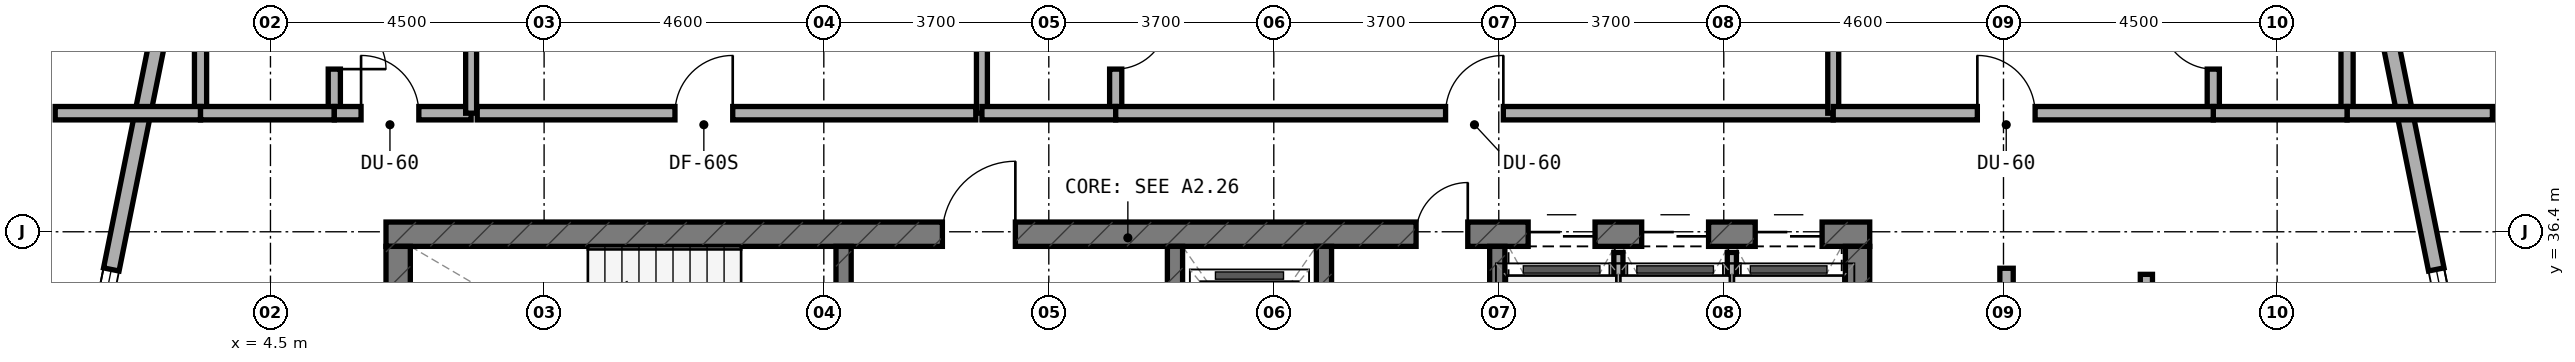
"""IFC4 building model, lengths in metres.
Left out: names, types, materials, properties, quantities, classifications, styles, units other than length and angle.
Written with IfcOpenShell. Run it as: python <this file> out.ifc"""

import sys

from ifc_helpers import new_model, si_unit, direction, frame, frame_2d, origin, place, context, subcontext, project, spatial, rectangle, extrude, element, fill, save


model = new_model("IFC4")
c1 = context("Model", 3, precision=1e-05, world=origin(), true_north=direction((0.0, 1.0)))
c2 = subcontext(c1, "Body", "Model", "MODEL_VIEW")
j1 = project(units=[si_unit("LENGTHUNIT", "METRE"), si_unit("PLANEANGLEUNIT", "RADIAN")], contexts=[c1])
p1 = place(None, origin())
s1 = spatial("IfcSite", under=j1, at=p1, CompositionType="ELEMENT")
p2 = place(p1, origin())
s2 = spatial("IfcBuilding", under=s1, at=p2, CompositionType="ELEMENT")
p3 = place(p2, frame((0.0, 0.0, 116.0)))
s3 = spatial("IfcBuildingStorey", under=s2, at=p3, CompositionType="ELEMENT", Elevation=116.0)
p4 = place(p3, frame((6.4, 36.36, 0.0), z_axis=(0.0, 0.0, 1.0), x_axis=(1.0, 0.0, 0.0)))
e1 = element("IfcWall", 1, at=p4, inside=s3, PredefinedType="SHEAR", context=c2, shape_type="SweptSolid", body=[
    extrude(rectangle(XDim=24.4, YDim=0.4, at=frame_2d((12.2, 0.0))), origin(), (0.0, 0.0, 1.0), 3.5),
])
p5 = place(p4, frame((9.15, 0.0, 0.0)))
e2 = element("IfcOpeningElement", 2, at=p5, cuts=e1, PredefinedType="OPENING", context=c2, shape_type="SweptSolid", body=[
    extrude(rectangle(XDim=1.2, YDim=2.15, at=frame_2d((0.6, 1.075))), frame((0.0, 0.21, 0.0), z_axis=(0.0, -1.0, 0.0), x_axis=(1.0, 0.0, 0.0)), (0.0, 0.0, 1.0), 0.42),
])
p6 = place(p4, frame((16.94, 0.0, 0.0)))
e3 = element("IfcOpeningElement", 3, at=p6, cuts=e1, PredefinedType="OPENING", context=c2, shape_type="SweptSolid", body=[
    extrude(rectangle(XDim=0.85, YDim=2.1, at=frame_2d((0.425, 1.05))), frame((0.0, 0.21, 0.0), z_axis=(0.0, -1.0, 0.0), x_axis=(1.0, 0.0, 0.0)), (0.0, 0.0, 1.0), 0.42),
])
p7 = place(p4, frame((18.783, 0.0, 0.0)))
e4 = element("IfcOpeningElement", 4, at=p7, cuts=e1, PredefinedType="OPENING", context=c2, shape_type="SweptSolid", body=[
    extrude(rectangle(XDim=1.1, YDim=2.15, at=frame_2d((0.55, 1.075))), frame((0.0, 0.21, 0.0), z_axis=(0.0, -1.0, 0.0), x_axis=(1.0, 0.0, 0.0)), (0.0, 0.0, 1.0), 0.42),
])
p8 = place(p4, frame((20.65, 0.0, 0.0)))
e5 = element("IfcOpeningElement", 5, at=p8, cuts=e1, PredefinedType="OPENING", context=c2, shape_type="SweptSolid", body=[
    extrude(rectangle(XDim=1.1, YDim=2.15, at=frame_2d((0.55, 1.075))), frame((0.0, 0.21, 0.0), z_axis=(0.0, -1.0, 0.0), x_axis=(1.0, 0.0, 0.0)), (0.0, 0.0, 1.0), 0.42),
])
p9 = place(p4, frame((22.517, 0.0, 0.0)))
e6 = element("IfcOpeningElement", 6, at=p9, cuts=e1, PredefinedType="OPENING", context=c2, shape_type="SweptSolid", body=[
    extrude(rectangle(XDim=1.1, YDim=2.15, at=frame_2d((0.55, 1.075))), frame((0.0, 0.21, 0.0), z_axis=(0.0, -1.0, 0.0), x_axis=(1.0, 0.0, 0.0)), (0.0, 0.0, 1.0), 0.42),
])
for number, where, z_axis, x_axis in (
    (7, (6.6, 33.0, 0.0), (0.0, 0.0, 1.0), (0.0, 1.0, 0.0)),
    (8, (30.6, 33.0, 0.0), (0.0, 0.0, 1.0), (0.0, 1.0, 0.0)),
):
    element("IfcWall", number, at=place(p3, frame(where, z_axis=z_axis, x_axis=x_axis)), inside=s3, PredefinedType="SHEAR", context=c2, shape_type="SweptSolid", body=[
        extrude(rectangle(XDim=3.16, YDim=0.4, at=frame_2d((1.58, 0.0))), origin(), (0.0, 0.0, 1.0), 3.5),
    ])
p10 = place(p3, frame((13.925, 33.0, 0.0), z_axis=(0.0, 0.0, 1.0), x_axis=(0.0, 1.0, 0.0)))
e9 = element("IfcWall", 9, at=p10, inside=s3, PredefinedType="STANDARD", context=c2, shape_type="SweptSolid", body=[
    extrude(rectangle(XDim=3.16, YDim=0.25, at=frame_2d((1.58, 0.0))), origin(), (0.0, 0.0, 1.0), 3.18),
])
p11 = place(p10, frame((0.98, 0.0, 0.0)))
e10 = element("IfcOpeningElement", 10, at=p11, cuts=e9, PredefinedType="OPENING", context=c2, shape_type="SweptSolid", body=[
    extrude(rectangle(XDim=1.1, YDim=2.15, at=frame_2d((0.55, 1.075))), frame((0.0, 0.135, 0.0), z_axis=(0.0, -1.0, 0.0), x_axis=(1.0, 0.0, 0.0)), (0.0, 0.0, 1.0), 0.27),
])
p12 = place(p3, frame((19.375, 33.0, 0.0), z_axis=(0.0, 0.0, 1.0), x_axis=(0.0, 1.0, 0.0)))
e11 = element("IfcWall", 11, at=p12, inside=s3, PredefinedType="STANDARD", context=c2, shape_type="SweptSolid", body=[
    extrude(rectangle(XDim=3.16, YDim=0.25, at=frame_2d((1.58, 0.0))), origin(), (0.0, 0.0, 1.0), 3.18),
])
p13 = place(p12, frame((0.98, 0.0, 0.0)))
e12 = element("IfcOpeningElement", 12, at=p13, cuts=e11, PredefinedType="OPENING", context=c2, shape_type="SweptSolid", body=[
    extrude(rectangle(XDim=1.1, YDim=2.15, at=frame_2d((0.55, 1.075))), frame((0.0, 0.135, 0.0), z_axis=(0.0, -1.0, 0.0), x_axis=(1.0, 0.0, 0.0)), (0.0, 0.0, 1.0), 0.27),
])
for number, where, z_axis, x_axis in (
    (13, (21.825, 33.0, 0.0), (0.0, 0.0, 1.0), (0.0, 1.0, 0.0)),
    (14, (24.675, 33.0, 0.0), (0.0, 0.0, 1.0), (0.0, 1.0, 0.0)),
):
    element("IfcWall", number, at=place(p3, frame(where, z_axis=z_axis, x_axis=x_axis)), inside=s3, PredefinedType="STANDARD", context=c2, shape_type="SweptSolid", body=[
        extrude(rectangle(XDim=3.16, YDim=0.25, at=frame_2d((1.58, 0.0))), origin(), (0.0, 0.0, 1.0), 3.18),
    ])
p14 = place(p3, frame((41.084, 30.98, 0.0), z_axis=(0.0, 0.0, 1.0), x_axis=(-0.197435082048, 0.980315963543, 0.0)))
e15 = element("IfcWall", 15, at=p14, inside=s3, PredefinedType="STANDARD", context=c2, shape_type="SweptSolid", body=[
    extrude(rectangle(XDim=9.183, YDim=0.26, at=frame_2d((4.591, 0.0))), origin(), (0.0, 0.0, 1.0), 3.18),
])
p15 = place(p14, frame((2.497, 0.0, 0.8)))
e16 = element("IfcOpeningElement", 16, at=p15, cuts=e15, PredefinedType="OPENING", context=c2, shape_type="SweptSolid", body=[
    extrude(rectangle(XDim=2.4, YDim=1.6, at=frame_2d((1.2, 0.8))), frame((0.0, 0.14, 0.0), z_axis=(0.0, -1.0, 0.0), x_axis=(1.0, 0.0, 0.0)), (0.0, 0.0, 1.0), 0.28),
])
p16 = place(p3, frame((2.729, 39.982, 0.0), z_axis=(0.0, 0.0, 1.0), x_axis=(-0.197435082048, -0.980315963543, 0.0)))
e17 = element("IfcWall", 17, at=p16, inside=s3, PredefinedType="STANDARD", context=c2, shape_type="SweptSolid", body=[
    extrude(rectangle(XDim=9.183, YDim=0.26, at=frame_2d((4.591, 0.0))), origin(), (0.0, 0.0, 1.0), 3.18),
])
p17 = place(p16, frame((4.286, 0.0, 0.8)))
e18 = element("IfcOpeningElement", 18, at=p17, cuts=e17, PredefinedType="OPENING", context=c2, shape_type="SweptSolid", body=[
    extrude(rectangle(XDim=2.4, YDim=1.6, at=frame_2d((1.2, 0.8))), frame((0.0, 0.14, 0.0), z_axis=(0.0, -1.0, 0.0), x_axis=(1.0, 0.0, 0.0)), (0.0, 0.0, 1.0), 0.28),
])
p18 = place(p3, frame((26.667, 33.1, 0.0), z_axis=(0.0, 0.0, 1.0), x_axis=(0.0, 1.0, 0.0)))
e19 = element("IfcWall", 19, at=p18, inside=s3, PredefinedType="PARTITIONING", context=c2, shape_type="SweptSolid", body=[
    extrude(rectangle(XDim=2.96, YDim=0.15, at=frame_2d((1.48, 0.0))), origin(), (0.0, 0.0, 1.0), 3.18),
])
p19 = place(p3, frame((28.533, 33.1, 0.0), z_axis=(0.0, 0.0, 1.0), x_axis=(0.0, 1.0, 0.0)))
e20 = element("IfcWall", 20, at=p19, inside=s3, PredefinedType="PARTITIONING", context=c2, shape_type="SweptSolid", body=[
    extrude(rectangle(XDim=2.96, YDim=0.15, at=frame_2d((1.48, 0.0))), origin(), (0.0, 0.0, 1.0), 2.655),
])
p20 = place(p3, frame((5.55, 38.45, 0.0), z_axis=(0.0, 0.0, 1.0), x_axis=(0.0, 1.0, 0.0)))
e21 = element("IfcWall", 21, at=p20, inside=s3, PredefinedType="PLUMBINGWALL", context=c2, shape_type="SweptSolid", body=[
    extrude(rectangle(XDim=2.1, YDim=0.2, at=frame_2d((1.05, 0.0))), origin(), (0.0, 0.0, 1.0), 3.18),
])
p21 = place(p20, frame((0.625, 0.0, 0.0)))
e22 = element("IfcOpeningElement", 22, at=p21, cuts=e21, PredefinedType="OPENING", context=c2, shape_type="SweptSolid", body=[
    extrude(rectangle(XDim=0.85, YDim=2.1, at=frame_2d((0.425, 1.05))), frame((0.0, 0.11, 0.0), z_axis=(0.0, -1.0, 0.0), x_axis=(1.0, 0.0, 0.0)), (0.0, 0.0, 1.0), 0.22),
])
p22 = place(p3, frame((3.35, 38.45, 0.0), z_axis=(0.0, 0.0, 1.0), x_axis=(0.0, 1.0, 0.0)))
e23 = element("IfcWall", 23, at=p22, inside=s3, PredefinedType="PLUMBINGWALL", context=c2, shape_type="SweptSolid", body=[
    extrude(rectangle(XDim=2.1, YDim=0.2, at=frame_2d((1.05, 0.0))), origin(), (0.0, 0.0, 1.0), 3.18),
])
p23 = place(p3, frame((0.96, 38.35, 0.0), z_axis=(0.0, 0.0, 1.0), x_axis=(1.0, 0.0, 0.0)))
e24 = element("IfcWall", 24, at=p23, inside=s3, PredefinedType="SOLIDWALL", context=c2, shape_type="SweptSolid", body=[
    extrude(rectangle(XDim=2.39, YDim=0.22, at=frame_2d((1.195, 0.0))), origin(), (0.0, 0.0, 1.0), 3.18),
])
p24 = place(p3, frame((3.35, 38.35, 0.0), z_axis=(0.0, 0.0, 1.0), x_axis=(1.0, 0.0, 0.0)))
e25 = element("IfcWall", 25, at=p24, inside=s3, PredefinedType="SOLIDWALL", context=c2, shape_type="SweptSolid", body=[
    extrude(rectangle(XDim=2.2, YDim=0.22, at=frame_2d((1.1, 0.0))), origin(), (0.0, 0.0, 1.0), 3.18),
])
p25 = place(p3, frame((5.55, 38.35, 0.0), z_axis=(0.0, 0.0, 1.0), x_axis=(1.0, 0.0, 0.0)))
e26 = element("IfcWall", 26, at=p25, inside=s3, PredefinedType="SOLIDWALL", context=c2, shape_type="SweptSolid", body=[
    extrude(rectangle(XDim=2.25, YDim=0.22, at=frame_2d((1.125, 0.0))), origin(), (0.0, 0.0, 1.0), 2.655),
])
p26 = place(p25, frame((0.44, 0.0, 0.0)))
e27 = element("IfcOpeningElement", 27, at=p26, cuts=e26, PredefinedType="OPENING", context=c2, shape_type="SweptSolid", body=[
    extrude(rectangle(XDim=0.95, YDim=2.1, at=frame_2d((0.475, 1.05))), frame((0.0, 0.12, 0.0), z_axis=(0.0, -1.0, 0.0), x_axis=(1.0, 0.0, 0.0)), (0.0, 0.0, 1.0), 0.24),
])
p27 = place(p3, frame((7.8, 38.35, 0.0), z_axis=(0.0, 0.0, 1.0), x_axis=(0.0, 1.0, 0.0)))
e28 = element("IfcWall", 28, at=p27, inside=s3, PredefinedType="SOLIDWALL", context=c2, shape_type="SweptSolid", body=[
    extrude(rectangle(XDim=5.351, YDim=0.18, at=frame_2d((2.675, 0.0))), origin(), (0.0, 0.0, 1.0), 2.655),
])
p28 = place(p3, frame((7.9, 38.35, 0.0), z_axis=(0.0, 0.0, 1.0), x_axis=(1.0, 0.0, 0.0)))
e29 = element("IfcWall", 29, at=p28, inside=s3, PredefinedType="SOLIDWALL", context=c2, shape_type="SweptSolid", body=[
    extrude(rectangle(XDim=8.2, YDim=0.22, at=frame_2d((4.1, 0.0))), origin(), (0.0, 0.0, 1.0), 3.18),
])
p29 = place(p28, frame((3.252, 0.0, 0.0)))
e30 = element("IfcOpeningElement", 30, at=p29, cuts=e29, PredefinedType="OPENING", context=c2, shape_type="SweptSolid", body=[
    extrude(rectangle(XDim=0.95, YDim=2.1, at=frame_2d((0.475, 1.05))), frame((0.0, 0.12, 0.0), z_axis=(0.0, -1.0, 0.0), x_axis=(1.0, 0.0, 0.0)), (0.0, 0.0, 1.0), 0.24),
])
p30 = place(p3, frame((16.2, 38.35, 0.0), z_axis=(0.0, 0.0, 1.0), x_axis=(0.0, 1.0, 0.0)))
e31 = element("IfcWall", 31, at=p30, inside=s3, PredefinedType="SOLIDWALL", context=c2, shape_type="SweptSolid", body=[
    extrude(rectangle(XDim=6.79, YDim=0.18, at=frame_2d((3.395, 0.0))), origin(), (0.0, 0.0, 1.0), 2.655),
])
p31 = place(p3, frame((18.4, 38.45, 0.0), z_axis=(0.0, 0.0, 1.0), x_axis=(0.0, 1.0, 0.0)))
e32 = element("IfcWall", 32, at=p31, inside=s3, PredefinedType="PLUMBINGWALL", context=c2, shape_type="SweptSolid", body=[
    extrude(rectangle(XDim=2.1, YDim=0.2, at=frame_2d((1.05, 0.0))), origin(), (0.0, 0.0, 1.0), 2.795),
])
p32 = place(p31, frame((0.625, 0.0, 0.0)))
e33 = element("IfcOpeningElement", 33, at=p32, cuts=e32, PredefinedType="OPENING", context=c2, shape_type="SweptSolid", body=[
    extrude(rectangle(XDim=0.85, YDim=2.1, at=frame_2d((0.425, 1.05))), frame((0.0, 0.11, 0.0), z_axis=(0.0, -1.0, 0.0), x_axis=(1.0, 0.0, 0.0)), (0.0, 0.0, 1.0), 0.22),
])
p33 = place(p3, frame((16.2, 38.35, 0.0), z_axis=(0.0, 0.0, 1.0), x_axis=(1.0, 0.0, 0.0)))
e34 = element("IfcWall", 34, at=p33, inside=s3, PredefinedType="SOLIDWALL", context=c2, shape_type="SweptSolid", body=[
    extrude(rectangle(XDim=2.2, YDim=0.22, at=frame_2d((1.1, 0.0))), origin(), (0.0, 0.0, 1.0), 2.655),
])
p34 = place(p3, frame((18.4, 38.35, 0.0), z_axis=(0.0, 0.0, 1.0), x_axis=(1.0, 0.0, 0.0)))
e35 = element("IfcWall", 35, at=p34, inside=s3, PredefinedType="SOLIDWALL", context=c2, shape_type="SweptSolid", body=[
    extrude(rectangle(XDim=11.8, YDim=0.22, at=frame_2d((5.9, 0.0))), origin(), (0.0, 0.0, 1.0), 2.655),
])
p35 = place(p34, frame((5.425, 0.0, 0.0)))
e36 = element("IfcOpeningElement", 36, at=p35, cuts=e35, PredefinedType="OPENING", context=c2, shape_type="SweptSolid", body=[
    extrude(rectangle(XDim=0.95, YDim=2.1, at=frame_2d((0.475, 1.05))), frame((0.0, 0.12, 0.0), z_axis=(0.0, -1.0, 0.0), x_axis=(1.0, 0.0, 0.0)), (0.0, 0.0, 1.0), 0.24),
])
p36 = place(p3, frame((30.2, 38.35, 0.0), z_axis=(0.0, 0.0, 1.0), x_axis=(0.0, 1.0, 0.0)))
e37 = element("IfcWall", 37, at=p36, inside=s3, PredefinedType="SOLIDWALL", context=c2, shape_type="SweptSolid", body=[
    extrude(rectangle(XDim=6.157, YDim=0.18, at=frame_2d((3.079, 0.0))), origin(), (0.0, 0.0, 1.0), 2.795),
])
p37 = place(p3, frame((36.45, 38.45, 0.0), z_axis=(0.0, 0.0, 1.0), x_axis=(0.0, 1.0, 0.0)))
e38 = element("IfcWall", 38, at=p37, inside=s3, PredefinedType="PLUMBINGWALL", context=c2, shape_type="SweptSolid", body=[
    extrude(rectangle(XDim=2.1, YDim=0.2, at=frame_2d((1.05, 0.0))), origin(), (0.0, 0.0, 1.0), 3.18),
])
p38 = place(p37, frame((0.625, 0.0, 0.0)))
e39 = element("IfcOpeningElement", 39, at=p38, cuts=e38, PredefinedType="OPENING", context=c2, shape_type="SweptSolid", body=[
    extrude(rectangle(XDim=0.85, YDim=2.1, at=frame_2d((0.425, 1.05))), frame((0.0, 0.11, 0.0), z_axis=(0.0, -1.0, 0.0), x_axis=(1.0, 0.0, 0.0)), (0.0, 0.0, 1.0), 0.22),
])
p39 = place(p3, frame((38.65, 38.45, 0.0), z_axis=(0.0, 0.0, 1.0), x_axis=(0.0, 1.0, 0.0)))
e40 = element("IfcWall", 40, at=p39, inside=s3, PredefinedType="PLUMBINGWALL", context=c2, shape_type="SweptSolid", body=[
    extrude(rectangle(XDim=2.1, YDim=0.2, at=frame_2d((1.05, 0.0))), origin(), (0.0, 0.0, 1.0), 3.18),
])
p40 = place(p3, frame((38.65, 38.35, 0.0), z_axis=(0.0, 0.0, 1.0), x_axis=(1.0, 0.0, 0.0)))
e41 = element("IfcWall", 41, at=p40, inside=s3, PredefinedType="SOLIDWALL", context=c2, shape_type="SweptSolid", body=[
    extrude(rectangle(XDim=2.39, YDim=0.22, at=frame_2d((1.195, 0.0))), origin(), (0.0, 0.0, 1.0), 3.18),
])
p41 = place(p3, frame((36.45, 38.35, 0.0), z_axis=(0.0, 0.0, 1.0), x_axis=(1.0, 0.0, 0.0)))
e42 = element("IfcWall", 42, at=p41, inside=s3, PredefinedType="SOLIDWALL", context=c2, shape_type="SweptSolid", body=[
    extrude(rectangle(XDim=2.2, YDim=0.22, at=frame_2d((1.1, 0.0))), origin(), (0.0, 0.0, 1.0), 3.18),
])
p42 = place(p3, frame((30.2, 38.35, 0.0), z_axis=(0.0, 0.0, 1.0), x_axis=(1.0, 0.0, 0.0)))
e43 = element("IfcWall", 43, at=p42, inside=s3, PredefinedType="SOLIDWALL", context=c2, shape_type="SweptSolid", body=[
    extrude(rectangle(XDim=6.25, YDim=0.22, at=frame_2d((3.125, 0.0))), origin(), (0.0, 0.0, 1.0), 2.655),
])
p43 = place(p42, frame((2.37, 0.0, 0.0)))
e44 = element("IfcOpeningElement", 44, at=p43, cuts=e43, PredefinedType="OPENING", context=c2, shape_type="SweptSolid", body=[
    extrude(rectangle(XDim=0.95, YDim=2.1, at=frame_2d((0.475, 1.05))), frame((0.0, 0.12, 0.0), z_axis=(0.0, -1.0, 0.0), x_axis=(1.0, 0.0, 0.0)), (0.0, 0.0, 1.0), 0.24),
])
p44 = place(p3, frame((35.35, 33.7, 0.0), z_axis=(0.0, 0.0, 1.0), x_axis=(0.0, 1.0, 0.0)))
e45 = element("IfcWall", 45, at=p44, inside=s3, PredefinedType="PLUMBINGWALL", context=c2, shape_type="SweptSolid", body=[
    extrude(rectangle(XDim=2.0, YDim=0.2, at=frame_2d((1.0, 0.0))), origin(), (0.0, 0.0, 1.0), 2.795),
])
p45 = place(p3, frame((33.05, 33.6, 0.0), z_axis=(0.0, 0.0, 1.0), x_axis=(0.0, 1.0, 0.0)))
e46 = element("IfcWall", 46, at=p45, inside=s3, PredefinedType="SOLIDWALL", context=c2, shape_type="SweptSolid", body=[
    extrude(rectangle(XDim=2.2, YDim=0.22, at=frame_2d((1.1, 0.0))), origin(), (0.0, 0.0, 1.0), 3.18),
])
p46 = place(p15, origin())
e47 = element("IfcWindow", 47, at=p46, inside=s3, PartitioningType="SINGLE_PANEL", PredefinedType="WINDOW", context=c2, shape_type="SweptSolid", body=[
    extrude(rectangle(XDim=2.4, YDim=1.6, at=frame_2d((1.2, 0.8))), frame((0.0, 0.03, 0.0), z_axis=(0.0, -1.0, 0.0), x_axis=(1.0, 0.0, 0.0)), (0.0, 0.0, 1.0), 0.06),
])
fill(e16, e47)
p47 = place(p17, origin())
e48 = element("IfcWindow", 48, at=p47, inside=s3, PartitioningType="SINGLE_PANEL", PredefinedType="WINDOW", context=c2, shape_type="SweptSolid", body=[
    extrude(rectangle(XDim=2.4, YDim=1.6, at=frame_2d((1.2, 0.8))), frame((0.0, 0.03, 0.0), z_axis=(0.0, -1.0, 0.0), x_axis=(1.0, 0.0, 0.0)), (0.0, 0.0, 1.0), 0.06),
])
fill(e18, e48)
p48 = place(p5, origin())
e49 = element("IfcDoor", 49, at=p48, inside=s3, OperationType="SINGLE_SWING_RIGHT", PredefinedType="DOOR", context=c2, shape_type="SweptSolid", body=[
    extrude(rectangle(XDim=1.2, YDim=2.15, at=frame_2d((0.6, 1.075))), frame((0.0, 0.025, 0.0), z_axis=(0.0, -1.0, 0.0), x_axis=(1.0, 0.0, 0.0)), (0.0, 0.0, 1.0), 0.05),
])
fill(e2, e49)
p49 = place(p6, origin())
e50 = element("IfcDoor", 50, at=p49, inside=s3, OperationType="SINGLE_SWING_RIGHT", PredefinedType="DOOR", context=c2, shape_type="SweptSolid", body=[
    extrude(rectangle(XDim=0.85, YDim=2.1, at=frame_2d((0.425, 1.05))), frame((0.0, 0.025, 0.0), z_axis=(0.0, -1.0, 0.0), x_axis=(1.0, 0.0, 0.0)), (0.0, 0.0, 1.0), 0.05),
])
fill(e3, e50)
p50 = place(p7, origin())
e51 = element("IfcDoor", 51, at=p50, inside=s3, OperationType="DOUBLE_DOOR_SLIDING", PredefinedType="DOOR", context=c2, shape_type="SweptSolid", body=[
    extrude(rectangle(XDim=1.1, YDim=2.15, at=frame_2d((0.55, 1.075))), frame((0.0, 0.025, 0.0), z_axis=(0.0, -1.0, 0.0), x_axis=(1.0, 0.0, 0.0)), (0.0, 0.0, 1.0), 0.05),
])
fill(e4, e51)
p51 = place(p8, origin())
e52 = element("IfcDoor", 52, at=p51, inside=s3, OperationType="DOUBLE_DOOR_SLIDING", PredefinedType="DOOR", context=c2, shape_type="SweptSolid", body=[
    extrude(rectangle(XDim=1.1, YDim=2.15, at=frame_2d((0.55, 1.075))), frame((0.0, 0.025, 0.0), z_axis=(0.0, -1.0, 0.0), x_axis=(1.0, 0.0, 0.0)), (0.0, 0.0, 1.0), 0.05),
])
fill(e5, e52)
p52 = place(p9, origin())
e53 = element("IfcDoor", 53, at=p52, inside=s3, OperationType="DOUBLE_DOOR_SLIDING", PredefinedType="DOOR", context=c2, shape_type="SweptSolid", body=[
    extrude(rectangle(XDim=1.1, YDim=2.15, at=frame_2d((0.55, 1.075))), frame((0.0, 0.025, 0.0), z_axis=(0.0, -1.0, 0.0), x_axis=(1.0, 0.0, 0.0)), (0.0, 0.0, 1.0), 0.05),
])
fill(e6, e53)
p53 = place(p21, frame((0.85, 0.0, 0.0), z_axis=(0.0, 0.0, 1.0), x_axis=(-1.0, 0.0, 0.0)))
e54 = element("IfcDoor", 54, at=p53, inside=s3, OperationType="SINGLE_SWING_RIGHT", PredefinedType="DOOR", context=c2, shape_type="SweptSolid", body=[
    extrude(rectangle(XDim=0.85, YDim=2.1, at=frame_2d((0.425, 1.05))), frame((0.0, 0.025, 0.0), z_axis=(0.0, -1.0, 0.0), x_axis=(1.0, 0.0, 0.0)), (0.0, 0.0, 1.0), 0.05),
])
fill(e22, e54)
p54 = place(p26, origin())
e55 = element("IfcDoor", 55, at=p54, inside=s3, OperationType="SINGLE_SWING_LEFT", PredefinedType="DOOR", context=c2, shape_type="SweptSolid", body=[
    extrude(rectangle(XDim=0.95, YDim=2.1, at=frame_2d((0.475, 1.05))), frame((0.0, 0.025, 0.0), z_axis=(0.0, -1.0, 0.0), x_axis=(1.0, 0.0, 0.0)), (0.0, 0.0, 1.0), 0.05),
])
fill(e27, e55)
p55 = place(p29, origin())
e56 = element("IfcDoor", 56, at=p55, inside=s3, OperationType="SINGLE_SWING_RIGHT", PredefinedType="DOOR", context=c2, shape_type="SweptSolid", body=[
    extrude(rectangle(XDim=0.95, YDim=2.1, at=frame_2d((0.475, 1.05))), frame((0.0, 0.025, 0.0), z_axis=(0.0, -1.0, 0.0), x_axis=(1.0, 0.0, 0.0)), (0.0, 0.0, 1.0), 0.05),
])
fill(e30, e56)
p56 = place(p32, frame((0.85, 0.0, 0.0), z_axis=(0.0, 0.0, 1.0), x_axis=(-1.0, 0.0, 0.0)))
e57 = element("IfcDoor", 57, at=p56, inside=s3, OperationType="SINGLE_SWING_LEFT", PredefinedType="DOOR", context=c2, shape_type="SweptSolid", body=[
    extrude(rectangle(XDim=0.85, YDim=2.1, at=frame_2d((0.425, 1.05))), frame((0.0, 0.025, 0.0), z_axis=(0.0, -1.0, 0.0), x_axis=(1.0, 0.0, 0.0)), (0.0, 0.0, 1.0), 0.05),
])
fill(e33, e57)
p57 = place(p35, origin())
e58 = element("IfcDoor", 58, at=p57, inside=s3, OperationType="SINGLE_SWING_RIGHT", PredefinedType="DOOR", context=c2, shape_type="SweptSolid", body=[
    extrude(rectangle(XDim=0.95, YDim=2.1, at=frame_2d((0.475, 1.05))), frame((0.0, 0.025, 0.0), z_axis=(0.0, -1.0, 0.0), x_axis=(1.0, 0.0, 0.0)), (0.0, 0.0, 1.0), 0.05),
])
fill(e36, e58)
p58 = place(p38, origin())
e59 = element("IfcDoor", 59, at=p58, inside=s3, OperationType="SINGLE_SWING_RIGHT", PredefinedType="DOOR", context=c2, shape_type="SweptSolid", body=[
    extrude(rectangle(XDim=0.85, YDim=2.1, at=frame_2d((0.425, 1.05))), frame((0.0, 0.025, 0.0), z_axis=(0.0, -1.0, 0.0), x_axis=(1.0, 0.0, 0.0)), (0.0, 0.0, 1.0), 0.05),
])
fill(e39, e59)
p59 = place(p43, origin())
e60 = element("IfcDoor", 60, at=p59, inside=s3, OperationType="SINGLE_SWING_LEFT", PredefinedType="DOOR", context=c2, shape_type="SweptSolid", body=[
    extrude(rectangle(XDim=0.95, YDim=2.1, at=frame_2d((0.475, 1.05))), frame((0.0, 0.025, 0.0), z_axis=(0.0, -1.0, 0.0), x_axis=(1.0, 0.0, 0.0)), (0.0, 0.0, 1.0), 0.05),
])
fill(e44, e60)
save(model, sys.argv[1])
